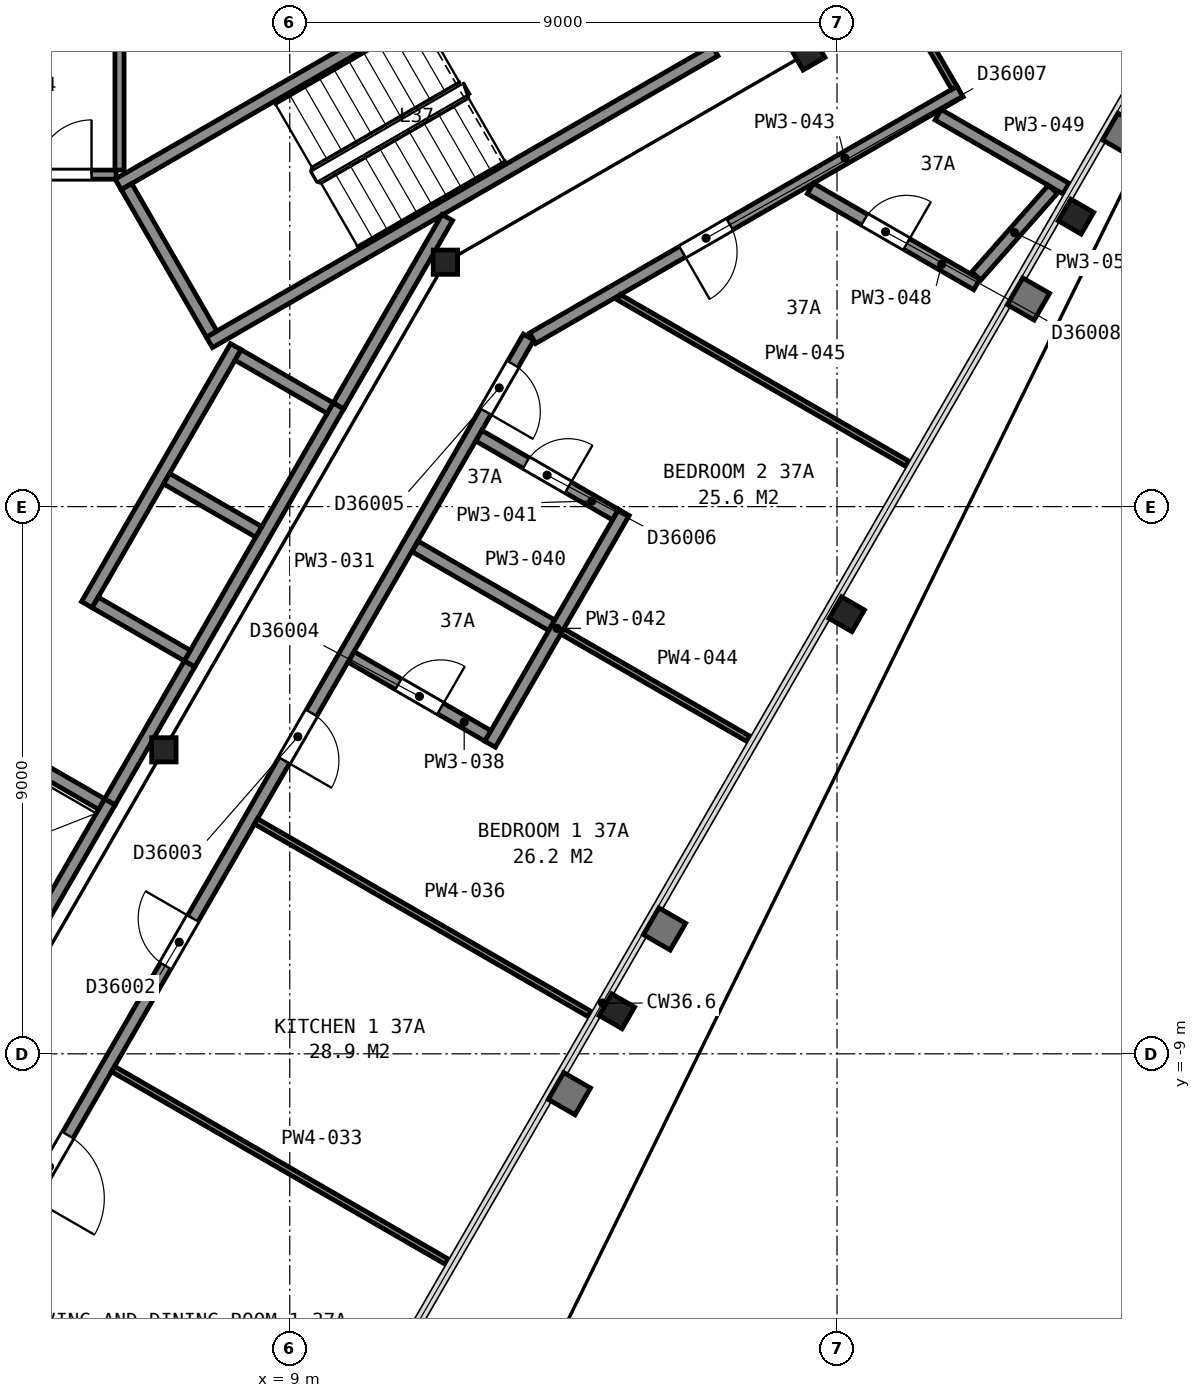
"""IFC4 building model, lengths in metres.
Left out: names, types, materials, properties, quantities, classifications, styles, units other than length and angle.
Written with IfcOpenShell. Run it as: python <this file> out.ifc"""

import sys

from ifc_helpers import new_model, si_unit, direction, frame, frame_2d, origin, origin_2d, place, context, subcontext, project, spatial, rectangle, i_section, extrude, element, fill, save


model = new_model("IFC4")
c1 = context("Model", 3, precision=1e-05, world=origin(), true_north=direction((0.0, 1.0)))
c2 = subcontext(c1, "Body", "Model", "MODEL_VIEW")
j1 = project(units=[si_unit("LENGTHUNIT", "METRE"), si_unit("PLANEANGLEUNIT", "RADIAN")], contexts=[c1])
p1 = place(None, origin())
s1 = spatial("IfcSite", under=j1, at=p1, CompositionType="ELEMENT")
p2 = place(p1, origin())
s2 = spatial("IfcBuilding", under=s1, at=p2, CompositionType="ELEMENT")
p3 = place(p2, frame((0.0, 0.0, 152.5)))
s3 = spatial("IfcBuildingStorey", under=s2, at=p3, CompositionType="ELEMENT", Elevation=152.5)
for number, where, z_axis, x_axis in (
    (1, (14.38, -8.3, 0.0), (0.0, 0.0, 1.0), (-0.5, -0.866, 0.0)),
    (2, (18.16, -1.77, 0.0), (0.0, 0.0, 1.0), (-0.5, -0.866, 0.0)),
):
    element("IfcColumn", number, at=place(p3, frame(where, z_axis=z_axis, x_axis=x_axis)), inside=s3, PredefinedType="COLUMN", context=c2, shape_type="SweptSolid", body=[
        extrude(i_section(OverallWidth=0.411, OverallDepth=0.434, WebThickness=0.036, FlangeThickness=0.057, FilletRadius=0.015, at=origin_2d()), origin(), (0.0, 0.0, 1.0), 3.665),
    ])
p4 = place(p3, frame((21.93, 4.77, 0.0), z_axis=(0.0, 0.0, 1.0), x_axis=(-0.5, -0.866025403784, 0.0)))
e3 = element("IfcColumn", 3, at=p4, inside=s3, PredefinedType="COLUMN", context=c2, shape_type="SweptSolid", body=[
    extrude(i_section(OverallWidth=0.411, OverallDepth=0.434, WebThickness=0.036, FlangeThickness=0.057, FilletRadius=0.015, at=origin_2d()), origin(), (0.0, 0.0, 1.0), 3.66),
])
p5 = place(p3, frame((11.56, 4.02, 0.0), z_axis=(0.0, 0.0, 1.0), x_axis=(1.0, 0.0, 0.0)))
e4 = element("IfcColumn", 4, at=p5, inside=s3, PredefinedType="COLUMN", context=c2, shape_type="SweptSolid", body=[
    extrude(i_section(OverallWidth=0.401, OverallDepth=0.399, WebThickness=0.025, FlangeThickness=0.04, FilletRadius=0.015, at=origin_2d()), origin(), (0.0, 0.0, 1.0), 3.7),
])
p6 = place(p3, frame((17.52, 7.46, 0.0), z_axis=(0.0, 0.0, 1.0), x_axis=(0.5, -0.866025403784, 0.0)))
e5 = element("IfcColumn", 5, at=p6, inside=s3, PredefinedType="COLUMN", context=c2, shape_type="SweptSolid", body=[
    extrude(i_section(OverallWidth=0.406, OverallDepth=0.417, WebThickness=0.03, FlangeThickness=0.048, FilletRadius=0.015, at=origin_2d()), origin(), (0.0, 0.0, 1.0), 3.7),
])
p7 = place(p3, frame((6.93, -4.0, 0.0), z_axis=(0.0, 0.0, 1.0), x_axis=(1.0, 0.0, 0.0)))
e6 = element("IfcColumn", 6, at=p7, inside=s3, PredefinedType="COLUMN", context=c2, shape_type="SweptSolid", body=[
    extrude(i_section(OverallWidth=0.401, OverallDepth=0.399, WebThickness=0.025, FlangeThickness=0.04, FilletRadius=0.015, at=origin_2d()), origin(), (0.0, 0.0, 1.0), 3.7),
])
for number, where, z_axis, x_axis in (
    (7, (6.178, 5.299, 0.0), (0.0, 0.0, 1.0), (0.866, 0.5, 0.0)),
    (8, (7.678, 2.701, 0.0), (0.0, 0.0, 1.0), (0.866, 0.5, 0.0)),
):
    element("IfcWall", number, at=place(p3, frame(where, z_axis=z_axis, x_axis=x_axis)), inside=s3, PredefinedType="PARTITIONING", context=c2, shape_type="SweptSolid", body=[
        extrude(rectangle(XDim=9.6, YDim=0.2, at=frame_2d((4.8, 0.0))), origin(), (0.0, 0.0, 1.0), 3.45),
    ])
p8 = place(p3, frame((7.715, 2.838, 0.0), z_axis=(0.0, 0.0, 1.0), x_axis=(-0.500049511043, 0.865996816683, 0.0)))
e9 = element("IfcWall", 9, at=p8, inside=s3, PredefinedType="PARTITIONING", context=c2, shape_type="SweptSolid", body=[
    extrude(rectangle(XDim=2.8, YDim=0.2, at=frame_2d((1.4, 0.0))), origin(), (0.0, 0.0, 1.0), 3.45),
])
p9 = place(p3, frame((4.766, -7.065, 0.0), z_axis=(0.0, 0.0, 1.0), x_axis=(0.499948979701, 0.866054858364, 0.0)))
e10 = element("IfcWall", 10, at=p9, inside=s3, PredefinedType="PARTITIONING", context=c2, shape_type="SweptSolid", body=[
    extrude(rectangle(XDim=2.55, YDim=0.2, at=frame_2d((1.275, 0.0))), origin(), (0.0, 0.0, 1.0), 3.7),
])
p10 = place(p3, frame((7.351, -2.587, 0.0), z_axis=(0.0, 0.0, 1.0), x_axis=(0.500002801628, 0.866023786258, 0.0)))
e11 = element("IfcWall", 11, at=p10, inside=s3, PredefinedType="PARTITIONING", context=c2, shape_type="SweptSolid", body=[
    extrude(rectangle(XDim=4.9, YDim=0.2, at=frame_2d((2.45, 0.0))), origin(), (0.0, 0.0, 1.0), 3.7),
])
p11 = place(p3, frame((5.663, -1.612, 0.0), z_axis=(0.0, 0.0, 1.0), x_axis=(0.49998122708, 0.866036242063, 0.0)))
e12 = element("IfcWall", 12, at=p11, inside=s3, PredefinedType="PARTITIONING", context=c2, shape_type="SweptSolid", body=[
    extrude(rectangle(XDim=4.9, YDim=0.2, at=frame_2d((2.45, 0.0))), origin(), (0.0, 0.0, 1.0), 3.7),
])
p12 = place(p3, frame((9.665, 1.62, 0.0), z_axis=(0.0, 0.0, 1.0), x_axis=(-0.866002029911, 0.500040482552, 0.0)))
e13 = element("IfcWall", 13, at=p12, inside=s3, PredefinedType="PARTITIONING", context=c2, shape_type="SweptSolid", body=[
    extrude(rectangle(XDim=1.75, YDim=0.2, at=frame_2d((0.875, 0.0))), origin(), (0.0, 0.0, 1.0), 3.7),
])
for number, where, z_axis, x_axis in (
    (14, (8.49, -0.416, 0.0), (0.0, 0.0, 1.0), (-0.866, 0.5, 0.0)),
    (15, (7.315, -2.451, 0.0), (0.0, 0.0, 1.0), (-0.866, 0.5, 0.0)),
):
    element("IfcWall", number, at=place(p3, frame(where, z_axis=z_axis, x_axis=x_axis)), inside=s3, PredefinedType="PARTITIONING", context=c2, shape_type="SweptSolid", body=[
        extrude(rectangle(XDim=1.75, YDim=0.2, at=frame_2d((0.875, 0.0))), origin(), (0.0, 0.0, 1.0), 3.7),
    ])
p13 = place(p3, frame((5.905, -4.893, 0.0), z_axis=(0.0, 0.0, 1.0), x_axis=(-0.866002029911, 0.500040482552, 0.0)))
e16 = element("IfcWall", 16, at=p13, inside=s3, PredefinedType="PARTITIONING", context=c2, shape_type="SweptSolid", body=[
    extrude(rectangle(XDim=1.75, YDim=0.2, at=frame_2d((0.875, 0.0))), origin(), (0.0, 0.0, 1.0), 3.7),
])
p14 = place(p3, frame((0.925, 5.46, 0.0), z_axis=(0.0, 0.0, 1.0), x_axis=(1.0, 0.0, 0.0)))
e17 = element("IfcWall", 17, at=p14, inside=s3, PredefinedType="PARTITIONING", context=c2, shape_type="SweptSolid", body=[
    extrude(rectangle(XDim=5.22, YDim=0.15, at=frame_2d((2.61, 0.0))), origin(), (0.0, 0.0, 1.0), 3.45),
])
p15 = place(p14, frame((3.915, 0.0, 0.0)))
e18 = element("IfcOpeningElement", 18, at=p15, cuts=e17, PredefinedType="OPENING", context=c2, shape_type="SweptSolid", body=[
    extrude(rectangle(XDim=0.9, YDim=2.1, at=frame_2d((0.45, 1.05))), frame((0.0, 0.085, 0.0), z_axis=(0.0, -1.0, 0.0), x_axis=(1.0, 0.0, 0.0)), (0.0, 0.0, 1.0), 0.17),
])
p16 = place(p3, frame((6.042, -4.855, 0.0), z_axis=(0.0, 0.0, 1.0), x_axis=(0.500252727967, 0.865879442048, 0.0)))
e19 = element("IfcWall", 19, at=p16, inside=s3, PredefinedType="PARTITIONING", context=c2, shape_type="SweptSolid", body=[
    extrude(rectangle(XDim=2.617, YDim=0.2, at=frame_2d((1.309, 0.0))), origin(), (0.0, 0.0, 1.0), 3.45),
])
p17 = place(p3, frame((6.2, 5.535, 0.0), z_axis=(0.0, 0.0, 1.0), x_axis=(0.0, 1.0, 0.0)))
e20 = element("IfcWall", 20, at=p17, inside=s3, PredefinedType="PARTITIONING", context=c2, shape_type="SweptSolid", body=[
    extrude(rectangle(XDim=2.025, YDim=0.15, at=frame_2d((1.013, 0.0))), origin(), (0.0, 0.0, 1.0), 3.45),
])
p18 = place(p3, frame((9.803, 1.658, 0.0), z_axis=(0.0, 0.0, 1.0), x_axis=(0.499943114462, 0.866058244174, 0.0)))
e21 = element("IfcWall", 21, at=p18, inside=s3, PredefinedType="PARTITIONING", context=c2, shape_type="SweptSolid", body=[
    extrude(rectangle(XDim=3.576, YDim=0.2, at=frame_2d((1.788, 0.0))), origin(), (0.0, 0.0, 1.0), 3.45),
])
p19 = place(p3, frame((12.928, 2.789, 0.0), z_axis=(0.0, 0.0, 1.0), x_axis=(-0.499997769292, -0.86602669168, 0.0)))
e22 = element("IfcWall", 22, at=p19, inside=s3, PredefinedType="PARTITIONING", context=c2, shape_type="SweptSolid", body=[
    extrude(rectangle(XDim=17.706, YDim=0.2, at=frame_2d((8.853, 0.0))), origin(), (0.0, 0.0, 1.0), 2.713),
])
p20 = place(p19, frame((15.156, 0.0, 0.0)))
e23 = element("IfcOpeningElement", 23, at=p20, cuts=e22, PredefinedType="OPENING", context=c2, shape_type="SweptSolid", body=[
    extrude(rectangle(XDim=1.2, YDim=2.1, at=frame_2d((0.6, 1.05))), frame((0.0, 0.11, 0.0), z_axis=(0.0, -1.0, 0.0), x_axis=(1.0, 0.0, 0.0)), (0.0, 0.0, 1.0), 0.22),
])
p21 = place(p19, frame((11.042, 0.0, 0.0)))
e24 = element("IfcOpeningElement", 24, at=p21, cuts=e22, PredefinedType="OPENING", context=c2, shape_type="SweptSolid", body=[
    extrude(rectangle(XDim=0.9, YDim=2.1, at=frame_2d((0.45, 1.05))), frame((0.0, 0.11, 0.0), z_axis=(0.0, -1.0, 0.0), x_axis=(1.0, 0.0, 0.0)), (0.0, 0.0, 1.0), 0.22),
])
p22 = place(p19, frame((7.14, 0.0, 0.0)))
e25 = element("IfcOpeningElement", 25, at=p22, cuts=e22, PredefinedType="OPENING", context=c2, shape_type="SweptSolid", body=[
    extrude(rectangle(XDim=0.9, YDim=2.1, at=frame_2d((0.45, 1.05))), frame((0.0, 0.11, 0.0), z_axis=(0.0, -1.0, 0.0), x_axis=(1.0, 0.0, 0.0)), (0.0, 0.0, 1.0), 0.22),
])
p23 = place(p19, frame((0.515, 0.0, 0.0)))
e26 = element("IfcOpeningElement", 26, at=p23, cuts=e22, PredefinedType="OPENING", context=c2, shape_type="SweptSolid", body=[
    extrude(rectangle(XDim=0.9, YDim=2.1, at=frame_2d((0.45, 1.05))), frame((0.0, 0.11, 0.0), z_axis=(0.0, -1.0, 0.0), x_axis=(1.0, 0.0, 0.0)), (0.0, 0.0, 1.0), 0.22),
])
for number, where, z_axis, x_axis in (
    (27, (6.094, -9.249, 0.0), (0.0, 0.0, 1.0), (0.866, -0.5, 0.0)),
    (28, (8.445, -5.177, 0.0), (0.0, 0.0, 1.0), (0.866, -0.5, 0.0)),
):
    element("IfcWall", number, at=place(p3, frame(where, z_axis=z_axis, x_axis=x_axis)), inside=s3, PredefinedType="PARTITIONING", context=c2, shape_type="SweptSolid", body=[
        extrude(rectangle(XDim=6.333, YDim=0.1, at=frame_2d((3.167, 0.0))), origin(), (0.0, 0.0, 1.0), 2.713),
    ])
p24 = place(p3, frame((10.011, -2.473, 0.0), z_axis=(0.0, 0.0, 1.0), x_axis=(0.866005410122, -0.500034628441, 0.0)))
e29 = element("IfcWall", 29, at=p24, inside=s3, PredefinedType="PARTITIONING", context=c2, shape_type="SweptSolid", body=[
    extrude(rectangle(XDim=2.595, YDim=0.2, at=frame_2d((1.297, 0.0))), origin(), (0.0, 0.0, 1.0), 2.713),
])
p25 = place(p24, frame((0.895, 0.0, 0.0)))
e30 = element("IfcOpeningElement", 30, at=p25, cuts=e29, PredefinedType="OPENING", context=c2, shape_type="SweptSolid", body=[
    extrude(rectangle(XDim=0.8, YDim=2.1, at=frame_2d((0.4, 1.05))), frame((0.0, 0.11, 0.0), z_axis=(0.0, -1.0, 0.0), x_axis=(1.0, 0.0, 0.0)), (0.0, 0.0, 1.0), 0.22),
])
p26 = place(p3, frame((11.061, -0.655, 0.0), z_axis=(0.0, 0.0, 1.0), x_axis=(0.866046148833, -0.4999640668, 0.0)))
e31 = element("IfcWall", 31, at=p26, inside=s3, PredefinedType="PARTITIONING", context=c2, shape_type="SweptSolid", body=[
    extrude(rectangle(XDim=2.595, YDim=0.2, at=frame_2d((1.297, 0.0))), origin(), (0.0, 0.0, 1.0), 2.713),
])
p27 = place(p3, frame((14.358, -0.133, 0.0), z_axis=(0.0, 0.0, 1.0), x_axis=(-0.866028930478, 0.499993891537, 0.0)))
e32 = element("IfcWall", 32, at=p27, inside=s3, PredefinedType="PARTITIONING", context=c2, shape_type="SweptSolid", body=[
    extrude(rectangle(XDim=2.595, YDim=0.2, at=frame_2d((1.298, 0.0))), origin(), (0.0, 0.0, 1.0), 2.713),
])
p28 = place(p27, frame((0.9, 0.0, 0.0)))
e33 = element("IfcOpeningElement", 33, at=p28, cuts=e32, PredefinedType="OPENING", context=c2, shape_type="SweptSolid", body=[
    extrude(rectangle(XDim=0.8, YDim=2.1, at=frame_2d((0.4, 1.05))), frame((0.0, 0.11, 0.0), z_axis=(0.0, -1.0, 0.0), x_axis=(1.0, 0.0, 0.0)), (0.0, 0.0, 1.0), 0.22),
])
p29 = place(p3, frame((12.295, -3.908, 0.0), z_axis=(0.0, 0.0, 1.0), x_axis=(0.499916153699, 0.866073807057, 0.0)))
e34 = element("IfcWall", 34, at=p29, inside=s3, PredefinedType="PARTITIONING", context=c2, shape_type="SweptSolid", body=[
    extrude(rectangle(XDim=4.401, YDim=0.2, at=frame_2d((2.2, 0.0))), origin(), (0.0, 0.0, 1.0), 2.713),
])
p30 = place(p3, frame((20.023, 6.826, 0.0), z_axis=(0.0, 0.0, 1.0), x_axis=(-0.866100425926, -0.499870035319, 0.0)))
e35 = element("IfcWall", 35, at=p30, inside=s3, PredefinedType="PARTITIONING", context=c2, shape_type="SweptSolid", body=[
    extrude(rectangle(XDim=8.115, YDim=0.2, at=frame_2d((4.058, 0.0))), origin(), (0.0, 0.0, 1.0), 2.713),
])
p31 = place(p30, frame((4.373, 0.0, 0.0)))
e36 = element("IfcOpeningElement", 36, at=p31, cuts=e35, PredefinedType="OPENING", context=c2, shape_type="SweptSolid", body=[
    extrude(rectangle(XDim=0.9, YDim=2.1, at=frame_2d((0.45, 1.05))), frame((0.0, 0.11, 0.0), z_axis=(0.0, -1.0, 0.0), x_axis=(1.0, 0.0, 0.0)), (0.0, 0.0, 1.0), 0.22),
])
p32 = place(p3, frame((13.482, -2.052, 0.0), z_axis=(0.0, 0.0, 1.0), x_axis=(0.865998048674, -0.500047377448, 0.0)))
e37 = element("IfcWall", 37, at=p32, inside=s3, PredefinedType="PARTITIONING", context=c2, shape_type="SweptSolid", body=[
    extrude(rectangle(XDim=3.534, YDim=0.1, at=frame_2d((1.767, 0.0))), origin(), (0.0, 0.0, 1.0), 2.713),
])
p33 = place(p3, frame((14.412, 3.444, 0.0), z_axis=(0.0, 0.0, 1.0), x_axis=(0.866045268016, -0.499965592563, 0.0)))
e38 = element("IfcWall", 38, at=p33, inside=s3, PredefinedType="PARTITIONING", context=c2, shape_type="SweptSolid", body=[
    extrude(rectangle(XDim=5.476, YDim=0.1, at=frame_2d((2.738, 0.0))), origin(), (0.0, 0.0, 1.0), 2.713),
])
p34 = place(p3, frame((15.928, 13.812, 0.0), z_axis=(0.0, 0.0, 1.0), x_axis=(0.500420003794, -0.865782778648, 0.0)))
e39 = element("IfcWall", 39, at=p34, inside=s3, PredefinedType="PARTITIONING", context=c2, shape_type="SweptSolid", body=[
    extrude(rectangle(XDim=7.997, YDim=0.1, at=frame_2d((3.999, 0.0))), origin(), (0.0, 0.0, 1.0), 2.713),
])
p35 = place(p34, frame((3.4, 0.0, 0.0)))
e40 = element("IfcOpeningElement", 40, at=p35, cuts=e39, PredefinedType="OPENING", context=c2, shape_type="SweptSolid", body=[
    extrude(rectangle(XDim=1.2, YDim=2.1, at=frame_2d((0.6, 1.05))), frame((0.0, 0.06, 0.0), z_axis=(0.0, -1.0, 0.0), x_axis=(1.0, 0.0, 0.0)), (0.0, 0.0, 1.0), 0.12),
])
p36 = place(p3, frame((17.562, 5.232, 0.0), z_axis=(0.0, 0.0, 1.0), x_axis=(0.866109679077, -0.499854002494, 0.0)))
e41 = element("IfcWall", 41, at=p36, inside=s3, PredefinedType="PARTITIONING", context=c2, shape_type="SweptSolid", body=[
    extrude(rectangle(XDim=3.16, YDim=0.2, at=frame_2d((1.58, 0.0))), origin(), (0.0, 0.0, 1.0), 2.713),
])
p37 = place(p36, frame((1.027, 0.0, 0.0)))
e42 = element("IfcOpeningElement", 42, at=p37, cuts=e41, PredefinedType="OPENING", context=c2, shape_type="SweptSolid", body=[
    extrude(rectangle(XDim=0.8, YDim=2.1, at=frame_2d((0.4, 1.05))), frame((0.0, 0.11, 0.0), z_axis=(0.0, -1.0, 0.0), x_axis=(1.0, 0.0, 0.0)), (0.0, 0.0, 1.0), 0.22),
])
p38 = place(p3, frame((19.663, 6.445, 0.0), z_axis=(0.0, 0.0, 1.0), x_axis=(0.86589602499, -0.50022402372, 0.0)))
e43 = element("IfcWall", 43, at=p38, inside=s3, PredefinedType="PARTITIONING", context=c2, shape_type="SweptSolid", body=[
    extrude(rectangle(XDim=2.43, YDim=0.2, at=frame_2d((1.215, 0.0))), origin(), (0.0, 0.0, 1.0), 2.713),
])
p39 = place(p3, frame((20.291, 3.793, 0.0), z_axis=(0.0, 0.0, 1.0), x_axis=(0.661392149771, 0.750040281733, 0.0)))
e44 = element("IfcWall", 44, at=p39, inside=s3, PredefinedType="PARTITIONING", context=c2, shape_type="SweptSolid", body=[
    extrude(rectangle(XDim=1.9, YDim=0.2, at=frame_2d((0.95, 0.0))), origin(), (0.0, 0.0, 1.0), 2.713),
])
p40 = place(p15, origin())
e45 = element("IfcDoor", 45, at=p40, inside=s3, OperationType="SINGLE_SWING_RIGHT", PredefinedType="DOOR", context=c2, shape_type="SweptSolid", body=[
    extrude(rectangle(XDim=0.9, YDim=2.1, at=frame_2d((0.45, 1.05))), frame((0.0, 0.025, 0.0), z_axis=(0.0, -1.0, 0.0), x_axis=(1.0, 0.0, 0.0)), (0.0, 0.0, 1.0), 0.05),
])
fill(e18, e45)
p41 = place(p20, origin())
e46 = element("IfcDoor", 46, at=p41, inside=s3, OperationType="SINGLE_SWING_RIGHT", PredefinedType="DOOR", context=c2, shape_type="SweptSolid", body=[
    extrude(rectangle(XDim=1.2, YDim=2.1, at=frame_2d((0.6, 1.05))), frame((0.0, 0.025, 0.0), z_axis=(0.0, -1.0, 0.0), x_axis=(1.0, 0.0, 0.0)), (0.0, 0.0, 1.0), 0.05),
])
fill(e23, e46)
p42 = place(p21, origin())
e47 = element("IfcDoor", 47, at=p42, inside=s3, OperationType="SINGLE_SWING_LEFT", PredefinedType="DOOR", context=c2, shape_type="SweptSolid", body=[
    extrude(rectangle(XDim=0.9, YDim=2.1, at=frame_2d((0.45, 1.05))), frame((0.0, 0.025, 0.0), z_axis=(0.0, -1.0, 0.0), x_axis=(1.0, 0.0, 0.0)), (0.0, 0.0, 1.0), 0.05),
])
fill(e24, e47)
p43 = place(p22, origin())
e48 = element("IfcDoor", 48, at=p43, inside=s3, OperationType="SINGLE_SWING_RIGHT", PredefinedType="DOOR", context=c2, shape_type="SweptSolid", body=[
    extrude(rectangle(XDim=0.9, YDim=2.1, at=frame_2d((0.45, 1.05))), frame((0.0, 0.025, 0.0), z_axis=(0.0, -1.0, 0.0), x_axis=(1.0, 0.0, 0.0)), (0.0, 0.0, 1.0), 0.05),
])
fill(e25, e48)
p44 = place(p23, origin())
e49 = element("IfcDoor", 49, at=p44, inside=s3, OperationType="SINGLE_SWING_RIGHT", PredefinedType="DOOR", context=c2, shape_type="SweptSolid", body=[
    extrude(rectangle(XDim=0.9, YDim=2.1, at=frame_2d((0.45, 1.05))), frame((0.0, 0.025, 0.0), z_axis=(0.0, -1.0, 0.0), x_axis=(1.0, 0.0, 0.0)), (0.0, 0.0, 1.0), 0.05),
])
fill(e26, e49)
p45 = place(p25, origin())
e50 = element("IfcDoor", 50, at=p45, inside=s3, OperationType="SINGLE_SWING_RIGHT", PredefinedType="DOOR", context=c2, shape_type="SweptSolid", body=[
    extrude(rectangle(XDim=0.8, YDim=2.1, at=frame_2d((0.4, 1.05))), frame((0.0, 0.025, 0.0), z_axis=(0.0, -1.0, 0.0), x_axis=(1.0, 0.0, 0.0)), (0.0, 0.0, 1.0), 0.05),
])
fill(e30, e50)
p46 = place(p28, origin())
e51 = element("IfcDoor", 51, at=p46, inside=s3, OperationType="SINGLE_SWING_LEFT", PredefinedType="DOOR", context=c2, shape_type="SweptSolid", body=[
    extrude(rectangle(XDim=0.8, YDim=2.1, at=frame_2d((0.4, 1.05))), frame((0.0, 0.025, 0.0), z_axis=(0.0, -1.0, 0.0), x_axis=(1.0, 0.0, 0.0)), (0.0, 0.0, 1.0), 0.05),
])
fill(e33, e51)
p47 = place(p31, origin())
e52 = element("IfcDoor", 52, at=p47, inside=s3, OperationType="SINGLE_SWING_RIGHT", PredefinedType="DOOR", context=c2, shape_type="SweptSolid", body=[
    extrude(rectangle(XDim=0.9, YDim=2.1, at=frame_2d((0.45, 1.05))), frame((0.0, 0.025, 0.0), z_axis=(0.0, -1.0, 0.0), x_axis=(1.0, 0.0, 0.0)), (0.0, 0.0, 1.0), 0.05),
])
fill(e36, e52)
p48 = place(p37, origin())
e53 = element("IfcDoor", 53, at=p48, inside=s3, OperationType="SINGLE_SWING_RIGHT", PredefinedType="DOOR", context=c2, shape_type="SweptSolid", body=[
    extrude(rectangle(XDim=0.8, YDim=2.1, at=frame_2d((0.4, 1.05))), frame((0.0, 0.025, 0.0), z_axis=(0.0, -1.0, 0.0), x_axis=(1.0, 0.0, 0.0)), (0.0, 0.0, 1.0), 0.05),
])
fill(e42, e53)
save(model, sys.argv[1])
